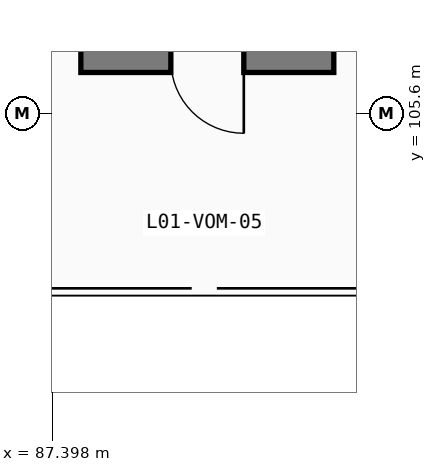
"""IFC4 building model, lengths in metres.
Left out: names, types, materials, properties, quantities, classifications, styles, units other than length and angle.
Written with IfcOpenShell. Run it as: python <this file> out.ifc"""

import sys

from ifc_helpers import new_model, si_unit, direction, frame, frame_2d, origin, place, context, subcontext, project, spatial, rectangle, extrude, element, fill, save


model = new_model("IFC4")
c1 = context("Model", 3, precision=1e-05, world=origin(), true_north=direction((0.0, 1.0)))
c2 = subcontext(c1, "Body", "Model", "MODEL_VIEW")
j1 = project(units=[si_unit("LENGTHUNIT", "METRE"), si_unit("PLANEANGLEUNIT", "RADIAN")], contexts=[c1])
p1 = place(None, origin())
s1 = spatial("IfcSite", under=j1, at=p1, CompositionType="ELEMENT")
p2 = place(p1, origin())
s2 = spatial("IfcBuilding", under=s1, at=p2, CompositionType="ELEMENT")
p3 = place(p2, frame((0.0, 0.0, 4.8)))
s3 = spatial("IfcBuildingStorey", under=s2, at=p3, CompositionType="ELEMENT", Elevation=4.8)
p4 = place(p3, frame((87.87, 106.47, 0.0), z_axis=(0.0, 0.0, 1.0), x_axis=(1.0, 0.0, 0.0)))
e1 = element("IfcWall", 1, at=p4, inside=s3, PredefinedType="SHEAR", context=c2, shape_type="SweptSolid", body=[
    extrude(rectangle(XDim=4.16, YDim=0.4, at=frame_2d((2.08, 0.0))), origin(), (0.0, 0.0, 1.0), 4.52),
])
p5 = place(p4, frame((2.68, 0.0, 0.0), z_axis=(0.0, 0.0, 1.0), x_axis=(-1.0, 0.0, 0.0)))
e2 = element("IfcOpeningElement", 2, at=p5, cuts=e1, PredefinedType="OPENING", context=c2, shape_type="SweptSolid", body=[
    extrude(rectangle(XDim=1.2, YDim=2.2, at=frame_2d((0.6, 1.1))), frame((0.0, 0.21, 0.0), z_axis=(0.0, -1.0, 0.0), x_axis=(1.0, 0.0, 0.0)), (0.0, 0.0, 1.0), 0.42),
])
p6 = place(p5, origin())
e3 = element("IfcDoor", 3, at=p6, inside=s3, OperationType="SINGLE_SWING_LEFT", PredefinedType="DOOR", context=c2, shape_type="SweptSolid", body=[
    extrude(rectangle(XDim=1.2, YDim=2.2, at=frame_2d((0.6, 1.1))), frame((0.0, 0.025, 0.0), z_axis=(0.0, -1.0, 0.0), x_axis=(1.0, 0.0, 0.0)), (0.0, 0.0, 1.0), 0.05),
])
fill(e2, e3)
save(model, sys.argv[1])
